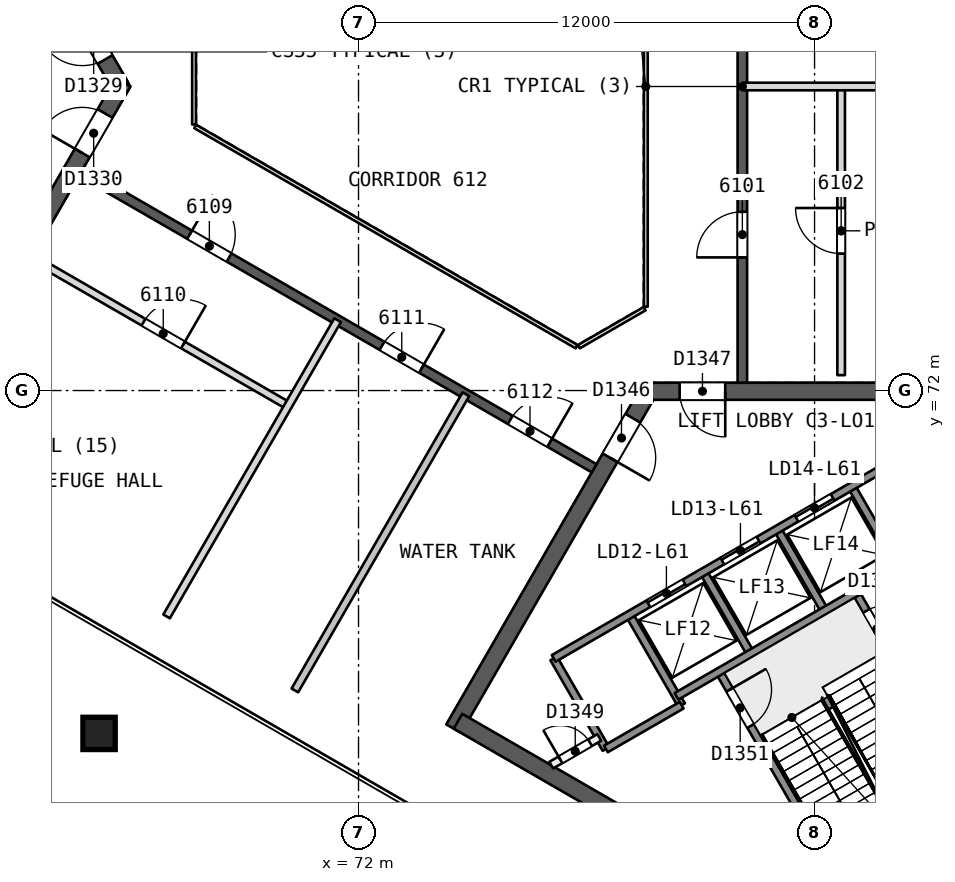
"""IFC4 building model, lengths in metres.
Left out: names, types, materials, properties, quantities, classifications, styles, units other than length and angle.
Written with IfcOpenShell. Run it as: python <this file> out.ifc"""

import sys

from ifc_helpers import new_model, si_unit, direction, frame, frame_2d, origin, origin_2d, place, context, subcontext, project, spatial, rectangle, extrude, element, fill, save


model = new_model("IFC4")
c1 = context("Model", 3, precision=1e-05, world=origin(), true_north=direction((0.0, 1.0)))
c2 = subcontext(c1, "Body", "Model", "MODEL_VIEW")
j1 = project(units=[si_unit("LENGTHUNIT", "METRE"), si_unit("PLANEANGLEUNIT", "RADIAN")], contexts=[c1])
p1 = place(None, origin())
s1 = spatial("IfcSite", under=j1, at=p1, CompositionType="ELEMENT")
p2 = place(p1, origin())
s2 = spatial("IfcBuilding", under=s1, at=p2, CompositionType="ELEMENT")
p3 = place(p2, frame((0.0, 0.0, 246.5)))
s3 = spatial("IfcBuildingStorey", under=s2, at=p3, CompositionType="ELEMENT", Elevation=246.5)
p4 = place(p3, frame((65.74, 80.0, 0.0), z_axis=(0.0, 0.0, 1.0), x_axis=(-0.499991857942, 0.866030104553, 0.0)))
e1 = element("IfcWall", 1, at=p4, inside=s3, PredefinedType="SHEAR", context=c2, shape_type="SweptSolid", body=[
    extrude(rectangle(XDim=10.25, YDim=0.45, at=frame_2d((5.125, 0.0))), origin(), (0.0, 0.0, 1.0), 8.8),
])
p5 = place(p4, frame((0.82, 0.0, 0.0)))
e2 = element("IfcOpeningElement", 2, at=p5, cuts=e1, PredefinedType="OPENING", context=c2, shape_type="SweptSolid", body=[
    extrude(rectangle(XDim=1.2, YDim=2.1, at=frame_2d((0.6, 1.05))), frame((0.0, 0.235, 0.0), z_axis=(0.0, -1.0, 0.0), x_axis=(1.0, 0.0, 0.0)), (0.0, 0.0, 1.0), 0.471),
])
p6 = place(p3, frame((60.728, 71.318, 0.0), z_axis=(0.0, 0.0, 1.0), x_axis=(0.500012416173, 0.866018235185, 0.0)))
e3 = element("IfcWall", 3, at=p6, inside=s3, PredefinedType="SHEAR", context=c2, shape_type="SweptSolid", body=[
    extrude(rectangle(XDim=10.155, YDim=0.45, at=frame_2d((5.078, 0.0))), origin(), (0.0, 0.0, 1.0), 8.8),
])
p7 = place(p6, frame((8.005, 0.0, 0.0)))
e4 = element("IfcOpeningElement", 4, at=p7, cuts=e3, PredefinedType="OPENING", context=c2, shape_type="SweptSolid", body=[
    extrude(rectangle(XDim=1.2, YDim=2.1, at=frame_2d((0.6, 1.05))), frame((0.0, 0.235, 0.0), z_axis=(0.0, -1.0, 0.0), x_axis=(1.0, 0.0, 0.0)), (0.0, 0.0, 1.0), 0.471),
])
p8 = place(p3, frame((79.63, 71.981, 0.0), z_axis=(0.0, 0.0, 1.0), x_axis=(-0.500002171595, -0.86602415001, 0.0)))
e5 = element("IfcWall", 5, at=p8, inside=s3, PredefinedType="SHEAR", context=c2, shape_type="SweptSolid", body=[
    extrude(rectangle(XDim=10.25, YDim=0.45, at=frame_2d((5.125, 0.0))), origin(), (0.0, 0.0, 1.0), 8.8),
])
p9 = place(p8, frame((0.82, 0.0, 0.0)))
e6 = element("IfcOpeningElement", 6, at=p9, cuts=e5, PredefinedType="OPENING", context=c2, shape_type="SweptSolid", body=[
    extrude(rectangle(XDim=1.2, YDim=2.1, at=frame_2d((0.6, 1.05))), frame((0.0, 0.235, 0.0), z_axis=(0.0, -1.0, 0.0), x_axis=(1.0, 0.0, 0.0)), (0.0, 0.0, 1.0), 0.471),
])
p10 = place(p3, frame((74.617, 63.299, 0.0), z_axis=(0.0, 0.0, 1.0), x_axis=(0.86602594008, -0.499999071108, 0.0)))
e7 = element("IfcWall", 7, at=p10, inside=s3, PredefinedType="SHEAR", context=c2, shape_type="SweptSolid", body=[
    extrude(rectangle(XDim=14.108, YDim=0.45, at=frame_2d((7.054, 0.0))), origin(), (0.0, 0.0, 1.0), 8.8),
])
p11 = place(p3, frame((89.655, 71.981, 0.0), z_axis=(0.0, 0.0, 1.0), x_axis=(-1.0, 0.0, 0.0)))
e8 = element("IfcWall", 8, at=p11, inside=s3, PredefinedType="SHEAR", context=c2, shape_type="SweptSolid", body=[
    extrude(rectangle(XDim=10.155, YDim=0.45, at=frame_2d((5.078, 0.0))), origin(), (0.0, 0.0, 1.0), 8.8),
])
p12 = place(p11, frame((8.005, 0.0, 0.0)))
e9 = element("IfcOpeningElement", 9, at=p12, cuts=e8, PredefinedType="OPENING", context=c2, shape_type="SweptSolid", body=[
    extrude(rectangle(XDim=1.2, YDim=2.1, at=frame_2d((0.6, 1.05))), frame((0.0, 0.235, 0.0), z_axis=(0.0, -1.0, 0.0), x_axis=(1.0, 0.0, 0.0)), (0.0, 0.0, 1.0), 0.471),
])
p13 = place(p3, frame((82.1, 72.206, 0.0), z_axis=(0.0, 0.0, 1.0), x_axis=(0.0, 1.0, 0.0)))
e10 = element("IfcWall", 10, at=p13, inside=s3, PredefinedType="SHEAR", context=c2, shape_type="SweptSolid", body=[
    extrude(rectangle(XDim=15.588, YDim=0.25, at=frame_2d((7.794, 0.0))), origin(), (0.0, 0.0, 1.0), 8.4),
])
p14 = place(p13, frame((3.297, 0.0, 0.0)))
e11 = element("IfcOpeningElement", 11, at=p14, cuts=e10, PredefinedType="OPENING", context=c2, shape_type="SweptSolid", body=[
    extrude(rectangle(XDim=1.2, YDim=2.4, at=frame_2d((0.6, 1.2))), frame((0.0, 0.135, 0.0), z_axis=(0.0, -1.0, 0.0), x_axis=(1.0, 0.0, 0.0)), (0.0, 0.0, 1.0), 0.271),
])
p15 = place(p13, frame((9.143, 0.0, 0.0)))
e12 = element("IfcOpeningElement", 12, at=p15, cuts=e10, PredefinedType="OPENING", context=c2, shape_type="SweptSolid", body=[
    extrude(rectangle(XDim=1.2, YDim=2.4, at=frame_2d((0.6, 1.2))), frame((0.0, 0.135, 0.0), z_axis=(0.0, -1.0, 0.0), x_axis=(1.0, 0.0, 0.0)), (0.0, 0.0, 1.0), 0.271),
])
p16 = place(p13, frame((13.04, 0.0, 0.0)))
e13 = element("IfcOpeningElement", 13, at=p16, cuts=e10, PredefinedType="OPENING", context=c2, shape_type="SweptSolid", body=[
    extrude(rectangle(XDim=1.2, YDim=2.4, at=frame_2d((0.6, 1.2))), frame((0.0, 0.135, 0.0), z_axis=(0.0, -1.0, 0.0), x_axis=(1.0, 0.0, 0.0)), (0.0, 0.0, 1.0), 0.271),
])
p17 = place(p3, frame((64.7, 77.748, 0.0), z_axis=(0.0, 0.0, 1.0), x_axis=(0.866026492143, -0.499998114903, 0.0)))
e14 = element("IfcWall", 14, at=p17, inside=s3, PredefinedType="SHEAR", context=c2, shape_type="SweptSolid", body=[
    extrude(rectangle(XDim=15.588, YDim=0.25, at=frame_2d((7.794, 0.0))), origin(), (0.0, 0.0, 1.0), 8.4),
])
p18 = place(p17, frame((3.297, 0.0, 0.0)))
e15 = element("IfcOpeningElement", 15, at=p18, cuts=e14, PredefinedType="OPENING", context=c2, shape_type="SweptSolid", body=[
    extrude(rectangle(XDim=1.2, YDim=2.4, at=frame_2d((0.6, 1.2))), frame((0.0, 0.135, 0.0), z_axis=(0.0, -1.0, 0.0), x_axis=(1.0, 0.0, 0.0)), (0.0, 0.0, 1.0), 0.271),
])
p19 = place(p17, frame((9.143, 0.0, 0.0)))
e16 = element("IfcOpeningElement", 16, at=p19, cuts=e14, PredefinedType="OPENING", context=c2, shape_type="SweptSolid", body=[
    extrude(rectangle(XDim=1.2, YDim=2.4, at=frame_2d((0.6, 1.2))), frame((0.0, 0.135, 0.0), z_axis=(0.0, -1.0, 0.0), x_axis=(1.0, 0.0, 0.0)), (0.0, 0.0, 1.0), 0.271),
])
p20 = place(p17, frame((13.04, 0.0, 0.0)))
e17 = element("IfcOpeningElement", 17, at=p20, cuts=e14, PredefinedType="OPENING", context=c2, shape_type="SweptSolid", body=[
    extrude(rectangle(XDim=1.2, YDim=2.4, at=frame_2d((0.6, 1.2))), frame((0.0, 0.135, 0.0), z_axis=(0.0, -1.0, 0.0), x_axis=(1.0, 0.0, 0.0)), (0.0, 0.0, 1.0), 0.271),
])
p21 = place(p3, frame((65.16, 62.958, 0.0), z_axis=(0.010096431238, 0.017474592527, 0.999796329605), x_axis=(-0.865867238205, 0.500273850809, 8.7355e-08)))
e18 = element("IfcColumn", 18, at=p21, inside=s3, PredefinedType="COLUMN", context=c2, shape_type="SweptSolid", body=[
    extrude(rectangle(XDim=0.85, YDim=0.85, at=origin_2d()), origin(), (0.0, 0.0, 1.0), 8.802),
])
p22 = place(p3, frame((84.7, 72.405, 0.0), z_axis=(0.0, 0.0, 1.0), x_axis=(0.0, 1.0, 0.0)))
e19 = element("IfcWall", 19, at=p22, inside=s3, PredefinedType="PARTITIONING", context=c2, shape_type="SweptSolid", body=[
    extrude(rectangle(XDim=7.595, YDim=0.2, at=frame_2d((3.798, 0.0))), origin(), (0.0, 0.0, 1.0), 8.4),
])
p23 = place(p22, frame((3.198, 0.0, 0.0)))
e20 = element("IfcOpeningElement", 20, at=p23, cuts=e19, PredefinedType="OPENING", context=c2, shape_type="SweptSolid", body=[
    extrude(rectangle(XDim=1.2, YDim=2.4, at=frame_2d((0.6, 1.2))), frame((0.0, 0.11, 0.0), z_axis=(0.0, -1.0, 0.0), x_axis=(1.0, 0.0, 0.0)), (0.0, 0.0, 1.0), 0.221),
])
p24 = place(p3, frame((91.1, 80.0, 0.0), z_axis=(0.0, 0.0, 1.0), x_axis=(-1.0, 0.0, 0.0)))
e21 = element("IfcWall", 21, at=p24, inside=s3, PredefinedType="PARTITIONING", context=c2, shape_type="SweptSolid", body=[
    extrude(rectangle(XDim=9.0, YDim=0.2, at=frame_2d((4.5, 0.0))), origin(), (0.0, 0.0, 1.0), 8.4),
])
p25 = place(p3, frame((63.572, 75.397, 0.0), z_axis=(0.0, 0.0, 1.0), x_axis=(0.866024999478, -0.500000700278, 0.0)))
e22 = element("IfcWall", 22, at=p25, inside=s3, PredefinedType="PARTITIONING", context=c2, shape_type="SweptSolid", body=[
    extrude(rectangle(XDim=7.595, YDim=0.2, at=frame_2d((3.798, 0.0))), origin(), (0.0, 0.0, 1.0), 8.4),
])
p26 = place(p25, frame((3.198, 0.0, 0.0)))
e23 = element("IfcOpeningElement", 23, at=p26, cuts=e22, PredefinedType="OPENING", context=c2, shape_type="SweptSolid", body=[
    extrude(rectangle(XDim=1.2, YDim=2.4, at=frame_2d((0.6, 1.2))), frame((0.0, 0.11, 0.0), z_axis=(0.0, -1.0, 0.0), x_axis=(1.0, 0.0, 0.0)), (0.0, 0.0, 1.0), 0.221),
])
p27 = place(p3, frame((66.95, 66.057, 0.0), z_axis=(0.0, 0.0, 1.0), x_axis=(0.499990139034, 0.866031096941, 0.0)))
e24 = element("IfcWall", 24, at=p27, inside=s3, PredefinedType="PARTITIONING", context=c2, shape_type="SweptSolid", body=[
    extrude(rectangle(XDim=9.0, YDim=0.2, at=frame_2d((4.5, 0.0))), origin(), (0.0, 0.0, 1.0), 8.4),
])
p28 = place(p3, frame((70.325, 64.108, 0.0), z_axis=(0.0, 0.0, 1.0), x_axis=(0.5000018851, 0.866024315419, 0.0)))
e25 = element("IfcWall", 25, at=p28, inside=s3, PredefinedType="PARTITIONING", context=c2, shape_type="SweptSolid", body=[
    extrude(rectangle(XDim=9.0, YDim=0.2, at=frame_2d((4.5, 0.0))), origin(), (0.0, 0.0, 1.0), 8.4),
])
for number, where, z_axis, x_axis in (
    (26, (77.135, 64.952, 0.0), (0.0, 0.0, 1.0), (0.5, -0.866, 0.0)),
    (27, (79.127, 66.102, 0.0), (0.0, 0.0, 1.0), (0.5, -0.866, 0.0)),
):
    element("IfcWall", number, at=place(p3, frame(where, z_axis=z_axis, x_axis=x_axis)), inside=s3, PredefinedType="SOLIDWALL", context=c2, shape_type="SweptSolid", body=[
        extrude(rectangle(XDim=2.75, YDim=0.2, at=frame_2d((1.375, 0.0))), origin(), (0.0, 0.0, 1.0), 8.4),
    ])
p29 = place(p3, frame((81.493, 64.604, 0.0), z_axis=(0.0, 0.0, 1.0), x_axis=(0.500006057782, -0.866021906294, 0.0)))
e28 = element("IfcWall", 28, at=p29, inside=s3, PredefinedType="SOLIDWALL", context=c2, shape_type="SweptSolid", body=[
    extrude(rectangle(XDim=7.7, YDim=0.2, at=frame_2d((3.85, 0.0))), origin(), (0.0, 0.0, 1.0), 8.4),
])
p30 = place(p29, frame((0.55, 0.0, 0.0)))
e29 = element("IfcOpeningElement", 29, at=p30, cuts=e28, PredefinedType="OPENING", context=c2, shape_type="SweptSolid", body=[
    extrude(rectangle(XDim=1.1, YDim=2.1, at=frame_2d((0.55, 1.05))), frame((0.0, 0.11, 0.0), z_axis=(0.0, -1.0, 0.0), x_axis=(1.0, 0.0, 0.0)), (0.0, 0.0, 1.0), 0.221),
])
p31 = place(p3, frame((81.076, 67.227, 0.0), z_axis=(0.0, 0.0, 1.0), x_axis=(0.50000366821, -0.866023285932, 0.0)))
e30 = element("IfcWall", 30, at=p31, inside=s3, PredefinedType="SOLIDWALL", context=c2, shape_type="SweptSolid", body=[
    extrude(rectangle(XDim=2.48, YDim=0.2, at=frame_2d((1.24, 0.0))), origin(), (0.0, 0.0, 1.0), 8.4),
])
p32 = place(p3, frame((83.34, 65.555, 0.0), z_axis=(0.0, 0.0, 1.0), x_axis=(0.499946605688, -0.86605622881, 0.0)))
e31 = element("IfcWall", 31, at=p32, inside=s3, PredefinedType="SOLIDWALL", context=c2, shape_type="SweptSolid", body=[
    extrude(rectangle(XDim=2.2, YDim=0.2, at=frame_2d((1.1, 0.0))), origin(), (0.0, 0.0, 1.0), 8.4),
])
p33 = place(p3, frame((83.024, 68.352, 0.0), z_axis=(0.0, 0.0, 1.0), x_axis=(0.50000366821, -0.866023285932, 0.0)))
e32 = element("IfcWall", 32, at=p33, inside=s3, PredefinedType="SOLIDWALL", context=c2, shape_type="SweptSolid", body=[
    extrude(rectangle(XDim=2.48, YDim=0.2, at=frame_2d((1.24, 0.0))), origin(), (0.0, 0.0, 1.0), 8.4),
])
p34 = place(p3, frame((85.087, 66.679, 0.0), z_axis=(0.0, 0.0, 1.0), x_axis=(0.500019787375, -0.866013979237, 0.0)))
e33 = element("IfcWall", 33, at=p34, inside=s3, PredefinedType="SOLIDWALL", context=c2, shape_type="SweptSolid", body=[
    extrude(rectangle(XDim=7.7, YDim=0.2, at=frame_2d((3.85, 0.0))), origin(), (0.0, 0.0, 1.0), 8.4),
])
p35 = place(p34, frame((0.55, 0.0, 0.0)))
e34 = element("IfcOpeningElement", 34, at=p35, cuts=e33, PredefinedType="OPENING", context=c2, shape_type="SweptSolid", body=[
    extrude(rectangle(XDim=1.1, YDim=2.1, at=frame_2d((0.55, 1.05))), frame((0.0, 0.11, 0.0), z_axis=(0.0, -1.0, 0.0), x_axis=(1.0, 0.0, 0.0)), (0.0, 0.0, 1.0), 0.221),
])
p36 = place(p3, frame((84.973, 69.477, 0.0), z_axis=(0.0, 0.0, 1.0), x_axis=(0.499996545922, -0.866027397988, 0.0)))
e35 = element("IfcWall", 35, at=p36, inside=s3, PredefinedType="SOLIDWALL", context=c2, shape_type="SweptSolid", body=[
    extrude(rectangle(XDim=2.75, YDim=0.2, at=frame_2d((1.375, 0.0))), origin(), (0.0, 0.0, 1.0), 8.4),
])
p37 = place(p3, frame((77.135, 64.952, 0.0), z_axis=(0.0, 0.0, 1.0), x_axis=(0.866031916153, 0.499988720078, 0.0)))
e36 = element("IfcWall", 36, at=p37, inside=s3, PredefinedType="SOLIDWALL", context=c2, shape_type="SweptSolid", body=[
    extrude(rectangle(XDim=11.35, YDim=0.2, at=frame_2d((5.675, 0.0))), origin(), (0.0, 0.0, 1.0), 8.4),
])
p38 = place(p37, frame((2.875, 0.0, 0.0)))
e37 = element("IfcOpeningElement", 37, at=p38, cuts=e36, PredefinedType="OPENING", context=c2, shape_type="SweptSolid", body=[
    extrude(rectangle(XDim=1.1, YDim=2.1, at=frame_2d((0.55, 1.05))), frame((0.0, 0.11, 0.0), z_axis=(0.0, -1.0, 0.0), x_axis=(1.0, 0.0, 0.0)), (0.0, 0.0, 1.0), 0.221),
])
p39 = place(p37, frame((5.125, 0.0, 0.0)))
e38 = element("IfcOpeningElement", 38, at=p39, cuts=e36, PredefinedType="OPENING", context=c2, shape_type="SweptSolid", body=[
    extrude(rectangle(XDim=1.1, YDim=2.1, at=frame_2d((0.55, 1.05))), frame((0.0, 0.11, 0.0), z_axis=(0.0, -1.0, 0.0), x_axis=(1.0, 0.0, 0.0)), (0.0, 0.0, 1.0), 0.221),
])
p40 = place(p37, frame((7.375, 0.0, 0.0)))
e39 = element("IfcOpeningElement", 39, at=p40, cuts=e36, PredefinedType="OPENING", context=c2, shape_type="SweptSolid", body=[
    extrude(rectangle(XDim=1.1, YDim=2.1, at=frame_2d((0.55, 1.05))), frame((0.0, 0.11, 0.0), z_axis=(0.0, -1.0, 0.0), x_axis=(1.0, 0.0, 0.0)), (0.0, 0.0, 1.0), 0.221),
])
p41 = place(p3, frame((77.07, 62.143, 0.0), z_axis=(0.0, 0.0, 1.0), x_axis=(0.866013036001, 0.500021421018, 0.0)))
e40 = element("IfcWall", 40, at=p41, inside=s3, PredefinedType="PARTITIONING", context=c2, shape_type="SweptSolid", body=[
    extrude(rectangle(XDim=1.461, YDim=0.2, at=frame_2d((0.73, 0.0))), origin(), (0.0, 0.0, 1.0), 8.4),
])
p42 = place(p41, frame((0.281, 0.0, 0.0)))
e41 = element("IfcOpeningElement", 41, at=p42, cuts=e40, PredefinedType="OPENING", context=c2, shape_type="SweptSolid", body=[
    extrude(rectangle(XDim=0.9, YDim=2.1, at=frame_2d((0.45, 1.05))), frame((0.0, 0.11, 0.0), z_axis=(0.0, -1.0, 0.0), x_axis=(1.0, 0.0, 0.0)), (0.0, 0.0, 1.0), 0.221),
])
p43 = place(p3, frame((80.367, 63.954, 0.0), z_axis=(0.0, 0.0, 1.0), x_axis=(0.866026575979, 0.499997969693, 0.0)))
e42 = element("IfcWall", 42, at=p43, inside=s3, PredefinedType="SOLIDWALL", context=c2, shape_type="SweptSolid", body=[
    extrude(rectangle(XDim=6.75, YDim=0.2, at=frame_2d((3.375, 0.0))), origin(), (0.0, 0.0, 1.0), 8.4),
])
p44 = place(p3, frame((78.51, 62.57, 0.0), z_axis=(0.0, 0.0, 1.0), x_axis=(0.866053019151, 0.499952165731, 0.0)))
e43 = element("IfcWall", 43, at=p44, inside=s3, PredefinedType="SOLIDWALL", context=c2, shape_type="SweptSolid", body=[
    extrude(rectangle(XDim=2.3, YDim=0.2, at=frame_2d((1.15, 0.0))), origin(), (0.0, 0.0, 1.0), 8.4),
])
p45 = place(p3, frame((79.56, 74.206, 0.0), z_axis=(0.0, 0.0, 1.0), x_axis=(0.0, 1.0, 0.0)))
e44 = element("IfcWall", 44, at=p45, inside=s3, PredefinedType="PARTITIONING", context=c2, shape_type="SweptSolid", body=[
    extrude(rectangle(XDim=11.588, YDim=0.1, at=frame_2d((5.794, 0.0))), origin(), (0.0, 0.0, 1.0), 8.4),
])
p46 = place(p3, frame((67.672, 81.0, 0.0), z_axis=(0.0, 0.0, 1.0), x_axis=(0.0, -1.0, 0.0)))
e45 = element("IfcWall", 45, at=p46, inside=s3, PredefinedType="PARTITIONING", context=c2, shape_type="SweptSolid", body=[
    extrude(rectangle(XDim=2.0, YDim=0.1, at=frame_2d((1.0, 0.0))), origin(), (0.0, 0.0, 1.0), 8.4),
])
p47 = place(p3, frame((67.702, 78.948, 0.0), z_axis=(0.0, 0.0, 1.0), x_axis=(0.866026658274, -0.499997827154, 0.0)))
e46 = element("IfcWall", 46, at=p47, inside=s3, PredefinedType="PARTITIONING", context=c2, shape_type="SweptSolid", body=[
    extrude(rectangle(XDim=11.588, YDim=0.1, at=frame_2d((5.794, 0.0))), origin(), (0.0, 0.0, 1.0), 8.4),
])
p48 = place(p3, frame((77.798, 73.154, 0.0), z_axis=(0.0, 0.0, 1.0), x_axis=(0.866041268327, 0.499972520799, 0.0)))
e47 = element("IfcWall", 47, at=p48, inside=s3, PredefinedType="PARTITIONING", context=c2, shape_type="SweptSolid", body=[
    extrude(rectangle(XDim=2.0, YDim=0.1, at=frame_2d((1.0, 0.0))), origin(), (0.0, 0.0, 1.0), 8.4),
])
p49 = place(p14, origin())
e48 = element("IfcDoor", 48, at=p49, inside=s3, OperationType="SINGLE_SWING_LEFT", PredefinedType="NOTDEFINED", context=c2, shape_type="SweptSolid", body=[
    extrude(rectangle(XDim=1.2, YDim=2.4, at=frame_2d((0.6, 1.2))), frame((0.0, 0.025, 0.0), z_axis=(0.0, -1.0, 0.0), x_axis=(1.0, 0.0, 0.0)), (0.0, 0.0, 1.0), 0.05),
])
fill(e11, e48)
p50 = place(p23, origin())
e49 = element("IfcDoor", 49, at=p50, inside=s3, OperationType="SINGLE_SWING_RIGHT", PredefinedType="NOTDEFINED", context=c2, shape_type="SweptSolid", body=[
    extrude(rectangle(XDim=1.2, YDim=2.4, at=frame_2d((0.6, 1.2))), frame((0.0, 0.025, 0.0), z_axis=(0.0, -1.0, 0.0), x_axis=(1.0, 0.0, 0.0)), (0.0, 0.0, 1.0), 0.05),
])
fill(e20, e49)
p51 = place(p18, origin())
e50 = element("IfcDoor", 50, at=p51, inside=s3, OperationType="SINGLE_SWING_LEFT", PredefinedType="NOTDEFINED", context=c2, shape_type="SweptSolid", body=[
    extrude(rectangle(XDim=1.2, YDim=2.4, at=frame_2d((0.6, 1.2))), frame((0.0, 0.025, 0.0), z_axis=(0.0, -1.0, 0.0), x_axis=(1.0, 0.0, 0.0)), (0.0, 0.0, 1.0), 0.05),
])
fill(e15, e50)
p52 = place(p26, origin())
e51 = element("IfcDoor", 51, at=p52, inside=s3, OperationType="SINGLE_SWING_RIGHT", PredefinedType="NOTDEFINED", context=c2, shape_type="SweptSolid", body=[
    extrude(rectangle(XDim=1.2, YDim=2.4, at=frame_2d((0.6, 1.2))), frame((0.0, 0.025, 0.0), z_axis=(0.0, -1.0, 0.0), x_axis=(1.0, 0.0, 0.0)), (0.0, 0.0, 1.0), 0.05),
])
fill(e23, e51)
p53 = place(p19, origin())
e52 = element("IfcDoor", 52, at=p53, inside=s3, OperationType="SINGLE_SWING_RIGHT", PredefinedType="NOTDEFINED", context=c2, shape_type="SweptSolid", body=[
    extrude(rectangle(XDim=1.2, YDim=2.4, at=frame_2d((0.6, 1.2))), frame((0.0, 0.025, 0.0), z_axis=(0.0, -1.0, 0.0), x_axis=(1.0, 0.0, 0.0)), (0.0, 0.0, 1.0), 0.05),
])
fill(e16, e52)
p54 = place(p20, origin())
e53 = element("IfcDoor", 53, at=p54, inside=s3, OperationType="SINGLE_SWING_RIGHT", PredefinedType="NOTDEFINED", context=c2, shape_type="SweptSolid", body=[
    extrude(rectangle(XDim=1.2, YDim=2.4, at=frame_2d((0.6, 1.2))), frame((0.0, 0.025, 0.0), z_axis=(0.0, -1.0, 0.0), x_axis=(1.0, 0.0, 0.0)), (0.0, 0.0, 1.0), 0.05),
])
fill(e17, e53)
p55 = place(p5, origin())
e54 = element("IfcDoor", 54, at=p55, inside=s3, OperationType="SINGLE_SWING_RIGHT", PredefinedType="NOTDEFINED", context=c2, shape_type="SweptSolid", body=[
    extrude(rectangle(XDim=1.2, YDim=2.1, at=frame_2d((0.6, 1.05))), frame((0.0, 0.025, 0.0), z_axis=(0.0, -1.0, 0.0), x_axis=(1.0, 0.0, 0.0)), (0.0, 0.0, 1.0), 0.05),
])
fill(e2, e54)
p56 = place(p7, origin())
e55 = element("IfcDoor", 55, at=p56, inside=s3, OperationType="SINGLE_SWING_LEFT", PredefinedType="NOTDEFINED", context=c2, shape_type="SweptSolid", body=[
    extrude(rectangle(XDim=1.2, YDim=2.1, at=frame_2d((0.6, 1.05))), frame((0.0, 0.025, 0.0), z_axis=(0.0, -1.0, 0.0), x_axis=(1.0, 0.0, 0.0)), (0.0, 0.0, 1.0), 0.05),
])
fill(e4, e55)
p57 = place(p9, origin())
e56 = element("IfcDoor", 56, at=p57, inside=s3, OperationType="SINGLE_SWING_RIGHT", PredefinedType="NOTDEFINED", context=c2, shape_type="SweptSolid", body=[
    extrude(rectangle(XDim=1.2, YDim=2.1, at=frame_2d((0.6, 1.05))), frame((0.0, 0.025, 0.0), z_axis=(0.0, -1.0, 0.0), x_axis=(1.0, 0.0, 0.0)), (0.0, 0.0, 1.0), 0.05),
])
fill(e6, e56)
p58 = place(p12, origin())
e57 = element("IfcDoor", 57, at=p58, inside=s3, OperationType="SINGLE_SWING_LEFT", PredefinedType="NOTDEFINED", context=c2, shape_type="SweptSolid", body=[
    extrude(rectangle(XDim=1.2, YDim=2.1, at=frame_2d((0.6, 1.05))), frame((0.0, 0.025, 0.0), z_axis=(0.0, -1.0, 0.0), x_axis=(1.0, 0.0, 0.0)), (0.0, 0.0, 1.0), 0.05),
])
fill(e9, e57)
p59 = place(p38, origin())
e58 = element("IfcDoor", 58, at=p59, inside=s3, OperationType="SLIDING_TO_LEFT", PredefinedType="NOTDEFINED", context=c2, shape_type="SweptSolid", body=[
    extrude(rectangle(XDim=1.1, YDim=2.1, at=frame_2d((0.55, 1.05))), frame((0.0, 0.025, 0.0), z_axis=(0.0, -1.0, 0.0), x_axis=(1.0, 0.0, 0.0)), (0.0, 0.0, 1.0), 0.05),
])
fill(e37, e58)
p60 = place(p39, origin())
e59 = element("IfcDoor", 59, at=p60, inside=s3, OperationType="SLIDING_TO_RIGHT", PredefinedType="NOTDEFINED", context=c2, shape_type="SweptSolid", body=[
    extrude(rectangle(XDim=1.1, YDim=2.1, at=frame_2d((0.55, 1.05))), frame((0.0, 0.025, 0.0), z_axis=(0.0, -1.0, 0.0), x_axis=(1.0, 0.0, 0.0)), (0.0, 0.0, 1.0), 0.05),
])
fill(e38, e59)
p61 = place(p40, origin())
e60 = element("IfcDoor", 60, at=p61, inside=s3, OperationType="SLIDING_TO_LEFT", PredefinedType="NOTDEFINED", context=c2, shape_type="SweptSolid", body=[
    extrude(rectangle(XDim=1.1, YDim=2.1, at=frame_2d((0.55, 1.05))), frame((0.0, 0.025, 0.0), z_axis=(0.0, -1.0, 0.0), x_axis=(1.0, 0.0, 0.0)), (0.0, 0.0, 1.0), 0.05),
])
fill(e39, e60)
p62 = place(p42, origin())
e61 = element("IfcDoor", 61, at=p62, inside=s3, OperationType="SINGLE_SWING_LEFT", PredefinedType="NOTDEFINED", context=c2, shape_type="SweptSolid", body=[
    extrude(rectangle(XDim=0.9, YDim=2.1, at=frame_2d((0.45, 1.05))), frame((0.0, 0.025, 0.0), z_axis=(0.0, -1.0, 0.0), x_axis=(1.0, 0.0, 0.0)), (0.0, 0.0, 1.0), 0.05),
])
fill(e41, e61)
p63 = place(p35, origin())
e62 = element("IfcDoor", 62, at=p63, inside=s3, OperationType="SINGLE_SWING_RIGHT", PredefinedType="NOTDEFINED", context=c2, shape_type="SweptSolid", body=[
    extrude(rectangle(XDim=1.1, YDim=2.1, at=frame_2d((0.55, 1.05))), frame((0.0, 0.025, 0.0), z_axis=(0.0, -1.0, 0.0), x_axis=(1.0, 0.0, 0.0)), (0.0, 0.0, 1.0), 0.05),
])
fill(e34, e62)
p64 = place(p30, origin())
e63 = element("IfcDoor", 63, at=p64, inside=s3, OperationType="SINGLE_SWING_LEFT", PredefinedType="NOTDEFINED", context=c2, shape_type="SweptSolid", body=[
    extrude(rectangle(XDim=1.1, YDim=2.1, at=frame_2d((0.55, 1.05))), frame((0.0, 0.025, 0.0), z_axis=(0.0, -1.0, 0.0), x_axis=(1.0, 0.0, 0.0)), (0.0, 0.0, 1.0), 0.05),
])
fill(e29, e63)
save(model, sys.argv[1])
